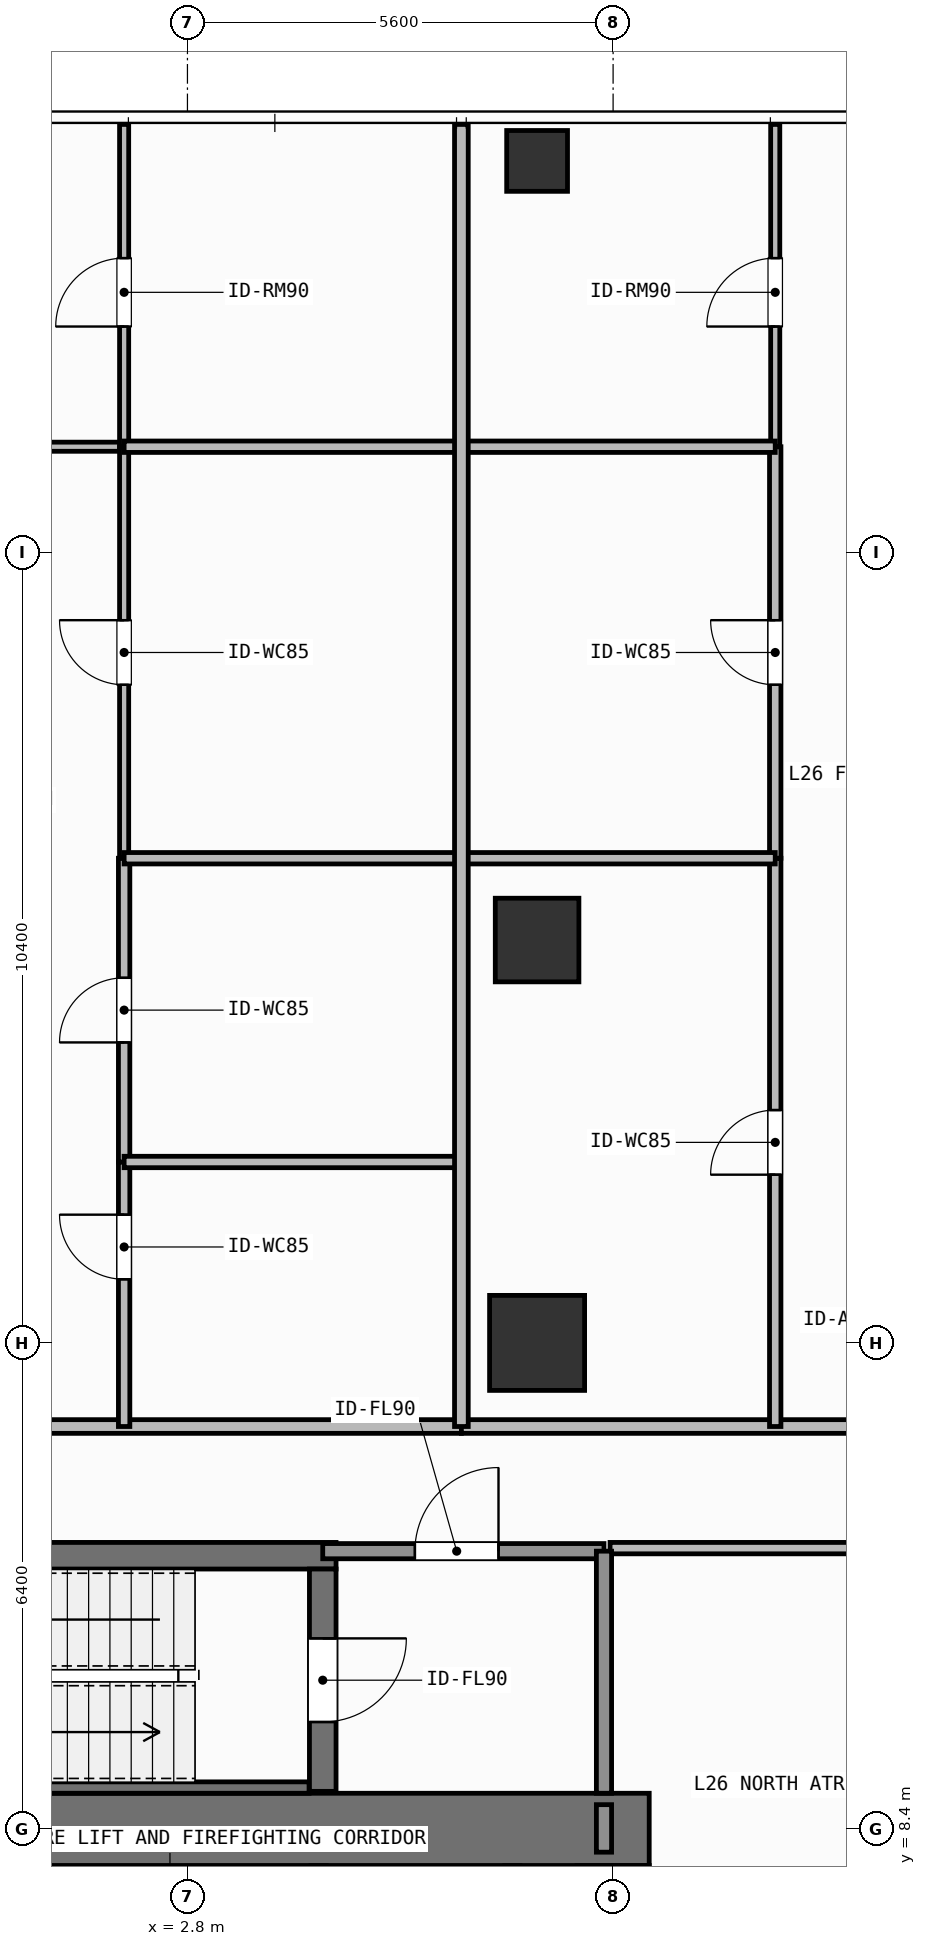
"""IFC4 building model, lengths in metres.
Left out: names, types, materials, properties, quantities, classifications, styles, units other than length and angle.
Written with IfcOpenShell. Run it as: python <this file> out.ifc"""

import sys

from ifc_helpers import new_model, si_unit, direction, frame, frame_2d, origin, origin_2d, place, context, subcontext, project, spatial, rectangle, hollow_rectangle, extrude, element, fill, save


model = new_model("IFC4")
c1 = context("Model", 3, precision=1e-05, world=origin(), true_north=direction((0.0, 1.0)))
c2 = subcontext(c1, "Body", "Model", "MODEL_VIEW")
j1 = project(units=[si_unit("LENGTHUNIT", "METRE"), si_unit("PLANEANGLEUNIT", "RADIAN")], contexts=[c1])
p1 = place(None, origin())
s1 = spatial("IfcSite", under=j1, at=p1, CompositionType="ELEMENT")
p2 = place(p1, origin())
s2 = spatial("IfcBuilding", under=s1, at=p2, CompositionType="ELEMENT")
p3 = place(p2, frame((0.0, 0.0, 104.7)))
s3 = spatial("IfcBuildingStorey", under=s2, at=p3, CompositionType="ELEMENT", Elevation=104.7)
p4 = place(p3, frame((-7.55, 8.4, 0.0), z_axis=(0.0, 0.0, 1.0), x_axis=(1.0, 0.0, 0.0)))
e1 = element("IfcWall", 1, at=p4, inside=s3, PredefinedType="SHEAR", context=c2, shape_type="SweptSolid", body=[
    extrude(rectangle(XDim=16.425, YDim=0.95, at=frame_2d((8.212, 0.0))), origin(), (0.0, 0.0, 1.0), 3.9),
])
p5 = place(p3, frame((8.4, 5.825, 0.0), z_axis=(0.0, 0.0, 1.0), x_axis=(0.0, 1.0, 0.0)))
e2 = element("IfcWall", 2, at=p5, inside=s3, PredefinedType="SHEAR", context=c2, shape_type="SweptSolid", body=[
    extrude(rectangle(XDim=2.1, YDim=0.95, at=frame_2d((1.05, 0.0))), origin(), (0.0, 0.0, 1.0), 3.9),
])
p6 = place(p3, frame((-2.555, 12.0, 0.0), z_axis=(0.0, 0.0, 1.0), x_axis=(1.0, 0.0, 0.0)))
e3 = element("IfcWall", 3, at=p6, inside=s3, PredefinedType="SHEAR", context=c2, shape_type="SweptSolid", body=[
    extrude(rectangle(XDim=7.31, YDim=0.35, at=frame_2d((3.655, 0.0))), origin(), (0.0, 0.0, 1.0), 3.9),
])
p7 = place(p3, frame((-2.2, 8.95, 0.0), z_axis=(0.0, 0.0, 1.0), x_axis=(1.0, 0.0, 0.0)))
e4 = element("IfcWall", 4, at=p7, inside=s3, PredefinedType="SHEAR", context=c2, shape_type="SweptSolid", body=[
    extrude(rectangle(XDim=6.6, YDim=0.15, at=frame_2d((3.3, 0.0))), origin(), (0.0, 0.0, 1.0), 3.9),
])
p8 = place(p3, frame((4.58, 11.825, 0.0), z_axis=(0.0, 0.0, 1.0), x_axis=(0.0, -1.0, 0.0)))
e5 = element("IfcWall", 5, at=p8, inside=s3, PredefinedType="SHEAR", context=c2, shape_type="SweptSolid", body=[
    extrude(rectangle(XDim=2.925, YDim=0.35, at=frame_2d((1.462, 0.0))), origin(), (0.0, 0.0, 1.0), 3.9),
])
p9 = place(p8, frame((0.913, 0.0, 0.0)))
e6 = element("IfcOpeningElement", 6, at=p9, cuts=e5, PredefinedType="OPENING", context=c2, shape_type="SweptSolid", body=[
    extrude(rectangle(XDim=1.1, YDim=2.15, at=frame_2d((0.55, 1.075))), frame((0.0, 0.185, 0.0), z_axis=(0.0, -1.0, 0.0), x_axis=(1.0, 0.0, 0.0)), (0.0, 0.0, 1.0), 0.37),
])
p10 = place(p3, frame((7.4, 14.8, 0.0), z_axis=(0.0, 0.0, 1.0), x_axis=(1.0, 0.0, 0.0)))
e7 = element("IfcColumn", 7, at=p10, inside=s3, PredefinedType="COLUMN", context=c2, shape_type="SweptSolid", body=[
    extrude(rectangle(XDim=1.25, YDim=1.25, at=origin_2d()), origin(), (0.0, 0.0, 1.0), 3.9),
])
p11 = place(p3, frame((7.4, 20.1, 0.0), z_axis=(0.0, 0.0, 1.0), x_axis=(1.0, 0.0, 0.0)))
e8 = element("IfcColumn", 8, at=p11, inside=s3, PredefinedType="COLUMN", context=c2, shape_type="SweptSolid", body=[
    extrude(rectangle(XDim=1.1, YDim=1.1, at=origin_2d()), origin(), (0.0, 0.0, 1.0), 3.9),
])
p12 = place(p3, frame((7.4, 30.35, 0.0), z_axis=(0.0, 0.0, 1.0), x_axis=(1.0, 0.0, 0.0)))
e9 = element("IfcColumn", 9, at=p12, inside=s3, PredefinedType="COLUMN", context=c2, shape_type="SweptSolid", body=[
    extrude(hollow_rectangle(XDim=0.8, YDim=0.8, WallThickness=0.036, at=origin_2d()), origin(), (0.0, 0.0, 1.0), 3.9),
])
p13 = place(p3, frame((4.525, 5.825, 0.0), z_axis=(0.0, 0.0, 1.0), x_axis=(0.0, 1.0, 0.0)))
e10 = element("IfcWall", 10, at=p13, inside=s3, PredefinedType="SHEAR", context=c2, shape_type="SweptSolid", body=[
    extrude(rectangle(XDim=2.1, YDim=0.2, at=frame_2d((1.05, 0.0))), origin(), (0.0, 0.0, 1.0), 3.62),
])
p14 = place(p13, frame((0.425, 0.0, 0.0)))
e11 = element("IfcOpeningElement", 11, at=p14, cuts=e10, PredefinedType="OPENING", context=c2, shape_type="SweptSolid", body=[
    extrude(rectangle(XDim=1.1, YDim=2.2, at=frame_2d((0.55, 1.1))), frame((0.0, 0.11, 0.0), z_axis=(0.0, -1.0, 0.0), x_axis=(1.0, 0.0, 0.0)), (0.0, 0.0, 1.0), 0.22),
])
p15 = place(p3, frame((7.075, 5.825, 0.0), z_axis=(0.0, 0.0, 1.0), x_axis=(0.0, 1.0, 0.0)))
e12 = element("IfcWall", 12, at=p15, inside=s3, PredefinedType="SHEAR", context=c2, shape_type="SweptSolid", body=[
    extrude(rectangle(XDim=2.1, YDim=0.2, at=frame_2d((1.05, 0.0))), origin(), (0.0, 0.0, 1.0), 3.62),
])
p16 = place(p3, frame((4.58, 12.06, 0.0), z_axis=(0.0, 0.0, 1.0), x_axis=(1.0, 0.0, 0.0)))
e13 = element("IfcWall", 13, at=p16, inside=s3, PredefinedType="SOLIDWALL", context=c2, shape_type="SweptSolid", body=[
    extrude(rectangle(XDim=3.7, YDim=0.2, at=frame_2d((1.85, 0.0))), origin(), (0.0, 0.0, 1.0), 3.62),
])
p17 = place(p16, frame((1.212, 0.0, 0.0)))
e14 = element("IfcOpeningElement", 14, at=p17, cuts=e13, PredefinedType="OPENING", context=c2, shape_type="SweptSolid", body=[
    extrude(rectangle(XDim=1.1, YDim=2.15, at=frame_2d((0.55, 1.075))), frame((0.0, 0.11, 0.0), z_axis=(0.0, -1.0, 0.0), x_axis=(1.0, 0.0, 0.0)), (0.0, 0.0, 1.0), 0.22),
])
p18 = place(p3, frame((8.36, 12.1, 0.0), z_axis=(0.0, 0.0, 1.0), x_axis=(1.0, 0.0, 0.0)))
e15 = element("IfcWall", 15, at=p18, inside=s3, PredefinedType="PARTITIONING", context=c2, shape_type="SweptSolid", body=[
    extrude(rectangle(XDim=7.22, YDim=0.15, at=frame_2d((3.61, 0.0))), origin(), (0.0, 0.0, 1.0), 3.62),
])
p19 = place(p18, frame((3.513, 0.0, 0.0)))
e16 = element("IfcOpeningElement", 16, at=p19, cuts=e15, PredefinedType="OPENING", context=c2, shape_type="SweptSolid", body=[
    extrude(rectangle(XDim=0.9, YDim=2.1, at=frame_2d((0.45, 1.05))), frame((0.0, 0.085, 0.0), z_axis=(0.0, -1.0, 0.0), x_axis=(1.0, 0.0, 0.0)), (0.0, 0.0, 1.0), 0.17),
])
p20 = place(p3, frame((-14.808, 13.7, 0.0), z_axis=(0.0, 0.0, 1.0), x_axis=(1.0, 0.0, 0.0)))
e17 = element("IfcWall", 17, at=p20, inside=s3, PredefinedType="PARTITIONING", context=c2, shape_type="SweptSolid", body=[
    extrude(rectangle(XDim=21.212, YDim=0.18, at=frame_2d((10.606, 0.0))), origin(), (0.0, 0.0, 1.0), 3.62),
])
p21 = place(p20, frame((11.271, 0.0, 0.0)))
e18 = element("IfcOpeningElement", 18, at=p21, cuts=e17, PredefinedType="OPENING", context=c2, shape_type="SweptSolid", body=[
    extrude(rectangle(XDim=1.0, YDim=2.2, at=frame_2d((0.5, 1.1))), frame((0.0, 0.1, 0.0), z_axis=(0.0, -1.0, 0.0), x_axis=(1.0, 0.0, 0.0)), (0.0, 0.0, 1.0), 0.2),
])
p22 = place(p3, frame((-3.723, 26.59, 0.0), z_axis=(0.0, 0.0, 1.0), x_axis=(1.0, 0.0, 0.0)))
e19 = element("IfcWall", 19, at=p22, inside=s3, PredefinedType="PARTITIONING", context=c2, shape_type="SweptSolid", body=[
    extrude(rectangle(XDim=5.69, YDim=0.12, at=frame_2d((2.845, 0.0))), origin(), (0.0, 0.0, 1.0), 3.62),
])
p23 = place(p22, frame((2.306, 0.0, 0.0)))
e20 = element("IfcOpeningElement", 20, at=p23, cuts=e19, PredefinedType="OPENING", context=c2, shape_type="SweptSolid", body=[
    extrude(rectangle(XDim=0.9, YDim=2.1, at=frame_2d((0.45, 1.05))), frame((0.0, 0.07, 0.0), z_axis=(0.0, -1.0, 0.0), x_axis=(1.0, 0.0, 0.0)), (0.0, 0.0, 1.0), 0.14),
])
p24 = place(p3, frame((1.967, 13.7, 0.0), z_axis=(0.0, 0.0, 1.0), x_axis=(0.0, 1.0, 0.0)))
e21 = element("IfcWall", 21, at=p24, inside=s3, PredefinedType="PARTITIONING", context=c2, shape_type="SweptSolid", body=[
    extrude(rectangle(XDim=3.48, YDim=0.15, at=frame_2d((1.74, 0.0))), origin(), (0.0, 0.0, 1.0), 3.62),
])
p25 = place(p24, frame((1.937, 0.0, 0.0)))
e22 = element("IfcOpeningElement", 22, at=p25, cuts=e21, PredefinedType="OPENING", context=c2, shape_type="SweptSolid", body=[
    extrude(rectangle(XDim=0.85, YDim=2.1, at=frame_2d((0.425, 1.05))), frame((0.0, 0.085, 0.0), z_axis=(0.0, -1.0, 0.0), x_axis=(1.0, 0.0, 0.0)), (0.0, 0.0, 1.0), 0.17),
])
p26 = place(p3, frame((1.967, 17.18, 0.0), z_axis=(0.0, 0.0, 1.0), x_axis=(0.0, 1.0, 0.0)))
e23 = element("IfcWall", 23, at=p26, inside=s3, PredefinedType="PARTITIONING", context=c2, shape_type="SweptSolid", body=[
    extrude(rectangle(XDim=3.996, YDim=0.15, at=frame_2d((1.998, 0.0))), origin(), (0.0, 0.0, 1.0), 3.62),
])
p27 = place(p26, frame((1.573, 0.0, 0.0)))
e24 = element("IfcOpeningElement", 24, at=p27, cuts=e23, PredefinedType="OPENING", context=c2, shape_type="SweptSolid", body=[
    extrude(rectangle(XDim=0.85, YDim=2.1, at=frame_2d((0.425, 1.05))), frame((0.0, 0.085, 0.0), z_axis=(0.0, -1.0, 0.0), x_axis=(1.0, 0.0, 0.0)), (0.0, 0.0, 1.0), 0.17),
])
p28 = place(p3, frame((1.967, 21.176, 0.0), z_axis=(0.0, 0.0, 1.0), x_axis=(0.0, 1.0, 0.0)))
e25 = element("IfcWall", 25, at=p28, inside=s3, PredefinedType="PARTITIONING", context=c2, shape_type="SweptSolid", body=[
    extrude(rectangle(XDim=5.414, YDim=0.12, at=frame_2d((2.707, 0.0))), origin(), (0.0, 0.0, 1.0), 3.62),
])
p29 = place(p28, frame((2.282, 0.0, 0.0)))
e26 = element("IfcOpeningElement", 26, at=p29, cuts=e25, PredefinedType="OPENING", context=c2, shape_type="SweptSolid", body=[
    extrude(rectangle(XDim=0.85, YDim=2.1, at=frame_2d((0.425, 1.05))), frame((0.0, 0.07, 0.0), z_axis=(0.0, -1.0, 0.0), x_axis=(1.0, 0.0, 0.0)), (0.0, 0.0, 1.0), 0.14),
])
p30 = place(p3, frame((1.967, 26.59, 0.0), z_axis=(0.0, 0.0, 1.0), x_axis=(0.0, 1.0, 0.0)))
e27 = element("IfcWall", 27, at=p30, inside=s3, PredefinedType="PARTITIONING", context=c2, shape_type="SweptSolid", body=[
    extrude(rectangle(XDim=4.24, YDim=0.12, at=frame_2d((2.12, 0.0))), origin(), (0.0, 0.0, 1.0), 3.62),
])
p31 = place(p30, frame((1.581, 0.0, 0.0)))
e28 = element("IfcOpeningElement", 28, at=p31, cuts=e27, PredefinedType="OPENING", context=c2, shape_type="SweptSolid", body=[
    extrude(rectangle(XDim=0.9, YDim=2.1, at=frame_2d((0.45, 1.05))), frame((0.0, 0.07, 0.0), z_axis=(0.0, -1.0, 0.0), x_axis=(1.0, 0.0, 0.0)), (0.0, 0.0, 1.0), 0.14),
])
p32 = place(p3, frame((6.404, 13.7, 0.0), z_axis=(0.0, 0.0, 1.0), x_axis=(1.0, 0.0, 0.0)))
e29 = element("IfcWall", 29, at=p32, inside=s3, PredefinedType="PARTITIONING", context=c2, shape_type="SweptSolid", body=[
    extrude(rectangle(XDim=12.216, YDim=0.18, at=frame_2d((6.108, 0.0))), origin(), (0.0, 0.0, 1.0), 3.62),
])
p33 = place(p32, frame((5.34, 0.0, 0.0)))
e30 = element("IfcOpeningElement", 30, at=p33, cuts=e29, PredefinedType="OPENING", context=c2, shape_type="SweptSolid", body=[
    extrude(rectangle(XDim=1.0, YDim=2.2, at=frame_2d((0.5, 1.1))), frame((0.0, 0.1, 0.0), z_axis=(0.0, -1.0, 0.0), x_axis=(1.0, 0.0, 0.0)), (0.0, 0.0, 1.0), 0.2),
])
p34 = place(p3, frame((10.533, 13.7, 0.0), z_axis=(0.0, 0.0, 1.0), x_axis=(0.0, 1.0, 0.0)))
e31 = element("IfcWall", 31, at=p34, inside=s3, PredefinedType="PARTITIONING", context=c2, shape_type="SweptSolid", body=[
    extrude(rectangle(XDim=7.476, YDim=0.15, at=frame_2d((3.738, 0.0))), origin(), (0.0, 0.0, 1.0), 3.62),
])
p35 = place(p34, frame((3.313, 0.0, 0.0)))
e32 = element("IfcOpeningElement", 32, at=p35, cuts=e31, PredefinedType="OPENING", context=c2, shape_type="SweptSolid", body=[
    extrude(rectangle(XDim=0.85, YDim=2.1, at=frame_2d((0.425, 1.05))), frame((0.0, 0.085, 0.0), z_axis=(0.0, -1.0, 0.0), x_axis=(1.0, 0.0, 0.0)), (0.0, 0.0, 1.0), 0.17),
])
p36 = place(p3, frame((10.533, 21.176, 0.0), z_axis=(0.0, 0.0, 1.0), x_axis=(0.0, 1.0, 0.0)))
e33 = element("IfcWall", 33, at=p36, inside=s3, PredefinedType="PARTITIONING", context=c2, shape_type="SweptSolid", body=[
    extrude(rectangle(XDim=5.414, YDim=0.15, at=frame_2d((2.707, 0.0))), origin(), (0.0, 0.0, 1.0), 3.62),
])
p37 = place(p36, frame((2.282, 0.0, 0.0)))
e34 = element("IfcOpeningElement", 34, at=p37, cuts=e33, PredefinedType="OPENING", context=c2, shape_type="SweptSolid", body=[
    extrude(rectangle(XDim=0.85, YDim=2.1, at=frame_2d((0.425, 1.05))), frame((0.0, 0.085, 0.0), z_axis=(0.0, -1.0, 0.0), x_axis=(1.0, 0.0, 0.0)), (0.0, 0.0, 1.0), 0.17),
])
p38 = place(p3, frame((10.533, 26.59, 0.0), z_axis=(0.0, 0.0, 1.0), x_axis=(0.0, 1.0, 0.0)))
e35 = element("IfcWall", 35, at=p38, inside=s3, PredefinedType="PARTITIONING", context=c2, shape_type="SweptSolid", body=[
    extrude(rectangle(XDim=4.24, YDim=0.12, at=frame_2d((2.12, 0.0))), origin(), (0.0, 0.0, 1.0), 3.62),
])
p39 = place(p38, frame((1.581, 0.0, 0.0)))
e36 = element("IfcOpeningElement", 36, at=p39, cuts=e35, PredefinedType="OPENING", context=c2, shape_type="SweptSolid", body=[
    extrude(rectangle(XDim=0.9, YDim=2.1, at=frame_2d((0.45, 1.05))), frame((0.0, 0.07, 0.0), z_axis=(0.0, -1.0, 0.0), x_axis=(1.0, 0.0, 0.0)), (0.0, 0.0, 1.0), 0.14),
])
p40 = place(p3, frame((8.28, 8.875, 0.0), z_axis=(0.0, 0.0, 1.0), x_axis=(0.0, 1.0, 0.0)))
e37 = element("IfcWall", 37, at=p40, inside=s3, PredefinedType="SOLIDWALL", context=c2, shape_type="SweptSolid", body=[
    extrude(rectangle(XDim=3.185, YDim=0.2, at=frame_2d((1.593, 0.0))), origin(), (0.0, 0.0, 1.0), 3.62),
])
p41 = place(p3, frame((8.28, 8.1, 0.0), z_axis=(0.0, 0.0, 1.0), x_axis=(0.0, 1.0, 0.0)))
e38 = element("IfcWall", 38, at=p41, inside=s3, PredefinedType="SOLIDWALL", context=c2, shape_type="SweptSolid", body=[
    extrude(rectangle(XDim=0.625, YDim=0.2, at=frame_2d((0.312, 0.0))), origin(), (0.0, 0.0, 1.0), 3.62),
])
for number, where, z_axis, x_axis in (
    (39, (1.967, 17.18, 0.0), (0.0, 0.0, 1.0), (1.0, 0.0, 0.0)),
    (40, (1.967, 21.176, 0.0), (0.0, 0.0, 1.0), (1.0, 0.0, 0.0)),
    (41, (1.967, 26.59, 0.0), (0.0, 0.0, 1.0), (1.0, 0.0, 0.0)),
):
    element("IfcWall", number, at=place(p3, frame(where, z_axis=z_axis, x_axis=x_axis)), inside=s3, PredefinedType="PARTITIONING", context=c2, shape_type="SweptSolid", body=[
        extrude(rectangle(XDim=4.437, YDim=0.15, at=frame_2d((2.219, 0.0))), origin(), (0.0, 0.0, 1.0), 3.62),
    ])
for number, where, z_axis, x_axis in (
    (42, (6.404, 21.176, 0.0), (0.0, 0.0, 1.0), (1.0, 0.0, 0.0)),
    (43, (6.404, 26.59, 0.0), (0.0, 0.0, 1.0), (1.0, 0.0, 0.0)),
):
    element("IfcWall", number, at=place(p3, frame(where, z_axis=z_axis, x_axis=x_axis)), inside=s3, PredefinedType="PARTITIONING", context=c2, shape_type="SweptSolid", body=[
        extrude(rectangle(XDim=4.129, YDim=0.15, at=frame_2d((2.064, 0.0))), origin(), (0.0, 0.0, 1.0), 3.62),
    ])
p42 = place(p3, frame((6.404, 13.7, 0.0), z_axis=(0.0, 0.0, 1.0), x_axis=(0.0, 1.0, 0.0)))
e44 = element("IfcWall", 44, at=p42, inside=s3, PredefinedType="PARTITIONING", context=c2, shape_type="SweptSolid", body=[
    extrude(rectangle(XDim=17.13, YDim=0.18, at=frame_2d((8.565, 0.0))), origin(), (0.0, 0.0, 1.0), 3.62),
])
p43 = place(p9, origin())
e45 = element("IfcDoor", 45, at=p43, inside=s3, OperationType="SINGLE_SWING_LEFT", PredefinedType="DOOR", context=c2, shape_type="SweptSolid", body=[
    extrude(rectangle(XDim=1.1, YDim=2.15, at=frame_2d((0.55, 1.075))), frame((0.0, 0.025, 0.0), z_axis=(0.0, -1.0, 0.0), x_axis=(1.0, 0.0, 0.0)), (0.0, 0.0, 1.0), 0.05),
])
fill(e6, e45)
p44 = place(p17, origin())
e46 = element("IfcDoor", 46, at=p44, inside=s3, OperationType="SINGLE_SWING_RIGHT", PredefinedType="DOOR", context=c2, shape_type="SweptSolid", body=[
    extrude(rectangle(XDim=1.1, YDim=2.15, at=frame_2d((0.55, 1.075))), frame((0.0, 0.025, 0.0), z_axis=(0.0, -1.0, 0.0), x_axis=(1.0, 0.0, 0.0)), (0.0, 0.0, 1.0), 0.05),
])
fill(e14, e46)
p45 = place(p25, origin())
e47 = element("IfcDoor", 47, at=p45, inside=s3, OperationType="SINGLE_SWING_RIGHT", PredefinedType="DOOR", context=c2, shape_type="SweptSolid", body=[
    extrude(rectangle(XDim=0.85, YDim=2.1, at=frame_2d((0.425, 1.05))), frame((0.0, 0.025, 0.0), z_axis=(0.0, -1.0, 0.0), x_axis=(1.0, 0.0, 0.0)), (0.0, 0.0, 1.0), 0.05),
])
fill(e22, e47)
p46 = place(p27, origin())
e48 = element("IfcDoor", 48, at=p46, inside=s3, OperationType="SINGLE_SWING_LEFT", PredefinedType="DOOR", context=c2, shape_type="SweptSolid", body=[
    extrude(rectangle(XDim=0.85, YDim=2.1, at=frame_2d((0.425, 1.05))), frame((0.0, 0.025, 0.0), z_axis=(0.0, -1.0, 0.0), x_axis=(1.0, 0.0, 0.0)), (0.0, 0.0, 1.0), 0.05),
])
fill(e24, e48)
p47 = place(p29, origin())
e49 = element("IfcDoor", 49, at=p47, inside=s3, OperationType="SINGLE_SWING_RIGHT", PredefinedType="DOOR", context=c2, shape_type="SweptSolid", body=[
    extrude(rectangle(XDim=0.85, YDim=2.1, at=frame_2d((0.425, 1.05))), frame((0.0, 0.025, 0.0), z_axis=(0.0, -1.0, 0.0), x_axis=(1.0, 0.0, 0.0)), (0.0, 0.0, 1.0), 0.05),
])
fill(e26, e49)
p48 = place(p31, origin())
e50 = element("IfcDoor", 50, at=p48, inside=s3, OperationType="SINGLE_SWING_LEFT", PredefinedType="DOOR", context=c2, shape_type="SweptSolid", body=[
    extrude(rectangle(XDim=0.9, YDim=2.1, at=frame_2d((0.45, 1.05))), frame((0.0, 0.025, 0.0), z_axis=(0.0, -1.0, 0.0), x_axis=(1.0, 0.0, 0.0)), (0.0, 0.0, 1.0), 0.05),
])
fill(e28, e50)
p49 = place(p35, origin())
e51 = element("IfcDoor", 51, at=p49, inside=s3, OperationType="SINGLE_SWING_LEFT", PredefinedType="DOOR", context=c2, shape_type="SweptSolid", body=[
    extrude(rectangle(XDim=0.85, YDim=2.1, at=frame_2d((0.425, 1.05))), frame((0.0, 0.025, 0.0), z_axis=(0.0, -1.0, 0.0), x_axis=(1.0, 0.0, 0.0)), (0.0, 0.0, 1.0), 0.05),
])
fill(e32, e51)
p50 = place(p37, origin())
e52 = element("IfcDoor", 52, at=p50, inside=s3, OperationType="SINGLE_SWING_RIGHT", PredefinedType="DOOR", context=c2, shape_type="SweptSolid", body=[
    extrude(rectangle(XDim=0.85, YDim=2.1, at=frame_2d((0.425, 1.05))), frame((0.0, 0.025, 0.0), z_axis=(0.0, -1.0, 0.0), x_axis=(1.0, 0.0, 0.0)), (0.0, 0.0, 1.0), 0.05),
])
fill(e34, e52)
p51 = place(p39, origin())
e53 = element("IfcDoor", 53, at=p51, inside=s3, OperationType="SINGLE_SWING_LEFT", PredefinedType="DOOR", context=c2, shape_type="SweptSolid", body=[
    extrude(rectangle(XDim=0.9, YDim=2.1, at=frame_2d((0.45, 1.05))), frame((0.0, 0.025, 0.0), z_axis=(0.0, -1.0, 0.0), x_axis=(1.0, 0.0, 0.0)), (0.0, 0.0, 1.0), 0.05),
])
fill(e36, e53)
save(model, sys.argv[1])
